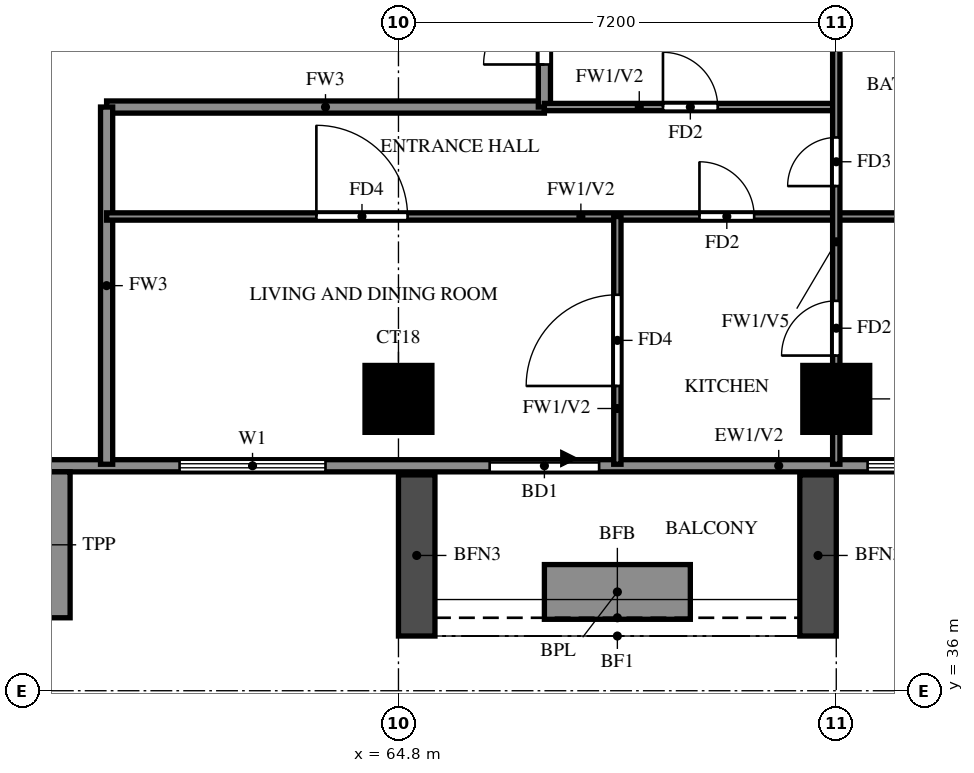
"""IFC4 building model, lengths in metres.
Left out: names, types, materials, properties, quantities, classifications, styles, units other than length and angle.
Written with IfcOpenShell. Run it as: python <this file> out.ifc"""

import sys

from ifc_helpers import new_model, si_unit, direction, frame, frame_2d, origin, origin_2d, place, context, subcontext, project, spatial, rectangle, extrude, source, transform, mapped, element, fill, save


model = new_model("IFC4")
c1 = context("Model", 3, precision=1e-05, world=origin(), true_north=direction((0.0, 1.0)))
c2 = subcontext(c1, "Body", "Model", "MODEL_VIEW")
j1 = project(units=[si_unit("LENGTHUNIT", "METRE"), si_unit("PLANEANGLEUNIT", "RADIAN")], contexts=[c1])
p1 = place(None, origin())
s1 = spatial("IfcSite", under=j1, at=p1, CompositionType="ELEMENT")
p2 = place(p1, origin())
s2 = spatial("IfcBuilding", under=s1, at=p2, CompositionType="ELEMENT")
p3 = place(p2, frame((0.0, 0.0, 116.5)))
s3 = spatial("IfcBuildingStorey", under=s2, at=p3, CompositionType="ELEMENT", Elevation=116.5)
m1 = source(origin(), c2, "Body", "SweptSolid", [
    extrude(rectangle(XDim=1.1, YDim=1.1, at=origin_2d()), origin(), (0.0, 0.0, 1.0), 3.2),
])
for number, where, z_axis, x_axis in (
    (1, (64.8, 40.8, 0.0), (0.0, 0.0, 1.0), (1.0, 0.0, 0.0)),
    (2, (72.0, 40.8, 0.0), (0.0, 0.0, 1.0), (1.0, 0.0, 0.0)),
):
    element("IfcColumn", number, at=place(p3, frame(where, z_axis=z_axis, x_axis=x_axis)), inside=s3, PredefinedType="COLUMN", context=c2, shape_type="MappedRepresentation", body=[
        mapped(m1, transform((0.0, 0.0, 0.0))),
    ])
p4 = place(p3, frame((85.719, 39.881, 0.0), z_axis=(0.0, 0.0, 1.0), x_axis=(-0.86377618652, 0.503875678716, 0.0)))
e3 = element("IfcWall", 3, at=p4, inside=s3, PredefinedType="SOLIDWALL", context=c2, shape_type="SweptSolid", body=[
    extrude(rectangle(XDim=16.311, YDim=0.2, at=frame_2d((8.156, 0.0))), origin(), (0.0, 0.0, 1.0), 3.2),
])
p5 = place(p4, frame((13.326, 0.0, 1.5)))
e4 = element("IfcOpeningElement", 4, at=p5, cuts=e3, PredefinedType="OPENING", context=c2, shape_type="SweptSolid", body=[
    extrude(rectangle(XDim=0.9, YDim=0.9, at=frame_2d((0.45, 0.45))), frame((0.0, 0.11, 0.0), z_axis=(0.0, -1.0, 0.0), x_axis=(1.0, 0.0, 0.0)), (0.0, 0.0, 1.0), 0.22),
])
p6 = place(p3, frame((58.8, 39.7, 0.0), z_axis=(0.0, 0.0, 1.0), x_axis=(1.0, 0.0, 0.0)))
e5 = element("IfcWall", 5, at=p6, inside=s3, PredefinedType="SOLIDWALL", context=c2, shape_type="SweptSolid", body=[
    extrude(rectangle(XDim=27.23, YDim=0.2, at=frame_2d((13.615, 0.0))), origin(), (0.0, 0.0, 1.0), 3.2),
])
p7 = place(p6, frame((7.5, 0.0, 0.0)))
e6 = element("IfcOpeningElement", 6, at=p7, cuts=e5, PredefinedType="OPENING", context=c2, shape_type="SweptSolid", body=[
    extrude(rectangle(XDim=1.8, YDim=2.4, at=frame_2d((0.9, 1.2))), frame((0.0, 0.11, 0.0), z_axis=(0.0, -1.0, 0.0), x_axis=(1.0, 0.0, 0.0)), (0.0, 0.0, 1.0), 0.22),
])
p8 = place(p6, frame((2.4, 0.0, 0.6)))
e7 = element("IfcOpeningElement", 7, at=p8, cuts=e5, PredefinedType="OPENING", context=c2, shape_type="SweptSolid", body=[
    extrude(rectangle(XDim=2.4, YDim=2.4, at=frame_2d((1.2, 1.2))), frame((0.0, 0.11, 0.0), z_axis=(0.0, -1.0, 0.0), x_axis=(1.0, 0.0, 0.0)), (0.0, 0.0, 1.0), 0.22),
])
p9 = place(p6, frame((13.715, 0.0, 0.6)))
e8 = element("IfcOpeningElement", 8, at=p9, cuts=e5, PredefinedType="OPENING", context=c2, shape_type="SweptSolid", body=[
    extrude(rectangle(XDim=2.4, YDim=2.4, at=frame_2d((1.2, 1.2))), frame((0.0, 0.11, 0.0), z_axis=(0.0, -1.0, 0.0), x_axis=(1.0, 0.0, 0.0)), (0.0, 0.0, 1.0), 0.22),
])
p10 = place(p6, frame((16.531, 0.0, 0.6)))
e9 = element("IfcOpeningElement", 9, at=p10, cuts=e5, PredefinedType="OPENING", context=c2, shape_type="SweptSolid", body=[
    extrude(rectangle(XDim=2.4, YDim=2.4, at=frame_2d((1.2, 1.2))), frame((0.0, 0.11, 0.0), z_axis=(0.0, -1.0, 0.0), x_axis=(1.0, 0.0, 0.0)), (0.0, 0.0, 1.0), 0.22),
])
p11 = place(p6, frame((19.346, 0.0, 0.6)))
e10 = element("IfcOpeningElement", 10, at=p11, cuts=e5, PredefinedType="OPENING", context=c2, shape_type="SweptSolid", body=[
    extrude(rectangle(XDim=2.4, YDim=2.4, at=frame_2d((1.2, 1.2))), frame((0.0, 0.11, 0.0), z_axis=(0.0, -1.0, 0.0), x_axis=(1.0, 0.0, 0.0)), (0.0, 0.0, 1.0), 0.22),
])
p12 = place(p6, frame((22.161, 0.0, 0.6)))
e11 = element("IfcOpeningElement", 11, at=p12, cuts=e5, PredefinedType="OPENING", context=c2, shape_type="SweptSolid", body=[
    extrude(rectangle(XDim=2.4, YDim=2.4, at=frame_2d((1.2, 1.2))), frame((0.0, 0.11, 0.0), z_axis=(0.0, -1.0, 0.0), x_axis=(1.0, 0.0, 0.0)), (0.0, 0.0, 1.0), 0.22),
])
p13 = place(p6, frame((26.003, 0.0, 0.6)))
e12 = element("IfcOpeningElement", 12, at=p13, cuts=e5, PredefinedType="OPENING", context=c2, shape_type="SweptSolid", body=[
    extrude(rectangle(XDim=0.9, YDim=2.4, at=frame_2d((0.45, 1.2))), frame((0.0, 0.11, 0.0), z_axis=(0.0, -1.0, 0.0), x_axis=(1.0, 0.0, 0.0)), (0.0, 0.0, 1.0), 0.22),
])
for number, where, z_axis, x_axis in (
    (13, (65.1, 39.55, 0.0), (0.0, 0.0, 1.0), (0.0, -1.0, 0.0)),
    (14, (71.7, 39.55, 0.0), (0.0, 0.0, 1.0), (0.0, -1.0, 0.0)),
):
    element("IfcWall", number, at=place(p3, frame(where, z_axis=z_axis, x_axis=x_axis)), inside=s3, PredefinedType="SOLIDWALL", context=c2, shape_type="SweptSolid", body=[
        extrude(rectangle(XDim=2.65, YDim=0.6, at=frame_2d((1.325, 0.0))), origin(), (0.0, 0.0, 1.0), 2.85),
    ])
p14 = place(p3, frame((67.2, 37.625, 0.0), z_axis=(0.0, 0.0, 1.0), x_axis=(1.0, 0.0, 0.0)))
e15 = element("IfcWall", 15, at=p14, inside=s3, PredefinedType="SOLIDWALL", context=c2, shape_type="SweptSolid", body=[
    extrude(rectangle(XDim=2.4, YDim=0.9, at=frame_2d((1.2, 0.0))), origin(), (0.0, 0.0, 1.0), 0.9),
])
p15 = place(p3, frame((58.5, 37.2, -0.3), z_axis=(0.0, 0.0, 1.0), x_axis=(0.0, 1.0, 0.0)))
e16 = element("IfcWall", 16, at=p15, inside=s3, PredefinedType="SOLIDWALL", context=c2, shape_type="SweptSolid", body=[
    extrude(rectangle(XDim=2.4, YDim=1.8, at=frame_2d((1.2, 0.0))), origin(), (0.0, 0.0, 1.0), 3.5),
])
p16 = place(p3, frame((60.0, 45.6, 0.0), z_axis=(0.0, 0.0, 1.0), x_axis=(1.0, 0.0, 0.0)))
e17 = element("IfcWall", 17, at=p16, inside=s3, PredefinedType="SOLIDWALL", context=c2, shape_type="SweptSolid", body=[
    extrude(rectangle(XDim=7.2, YDim=0.2, at=frame_2d((3.6, 0.0))), origin(), (0.0, 0.0, 1.0), 3.2),
])
p17 = place(p3, frame((60.0, 39.725, 0.0), z_axis=(0.0, 0.0, 1.0), x_axis=(0.0, 1.0, 0.0)))
e18 = element("IfcWall", 18, at=p17, inside=s3, PredefinedType="SOLIDWALL", context=c2, shape_type="SweptSolid", body=[
    extrude(rectangle(XDim=5.875, YDim=0.2, at=frame_2d((2.938, 0.0))), origin(), (0.0, 0.0, 1.0), 3.2),
])
p18 = place(p3, frame((67.2, 45.6, 0.0), z_axis=(0.0, 0.0, 1.0), x_axis=(0.0, 1.0, 0.0)))
e19 = element("IfcWall", 19, at=p18, inside=s3, PredefinedType="SOLIDWALL", context=c2, shape_type="SweptSolid", body=[
    extrude(rectangle(XDim=8.4, YDim=0.2, at=frame_2d((4.2, 0.0))), origin(), (0.0, 0.0, 1.0), 3.2),
])
p19 = place(p18, frame((0.7, 0.0, 0.0)))
e20 = element("IfcOpeningElement", 20, at=p19, cuts=e19, PredefinedType="OPENING", context=c2, shape_type="SweptSolid", body=[
    extrude(rectangle(XDim=1.0, YDim=2.1, at=frame_2d((0.5, 1.05))), frame((0.0, 0.11, 0.0), z_axis=(0.0, -1.0, 0.0), x_axis=(1.0, 0.0, 0.0)), (0.0, 0.0, 1.0), 0.22),
])
p20 = place(p3, frame((60.0, 43.8, 0.0), z_axis=(0.0, 0.0, 1.0), x_axis=(1.0, 0.0, 0.0)))
e21 = element("IfcWall", 21, at=p20, inside=s3, PredefinedType="PARTITIONING", context=c2, shape_type="SweptSolid", body=[
    extrude(rectangle(XDim=15.6, YDim=0.12, at=frame_2d((7.8, 0.0))), origin(), (0.0, 0.0, 1.0), 3.2),
])
p21 = place(p20, frame((9.75, 0.0, 0.0)))
e22 = element("IfcOpeningElement", 22, at=p21, cuts=e21, PredefinedType="OPENING", context=c2, shape_type="SweptSolid", body=[
    extrude(rectangle(XDim=0.9, YDim=2.1, at=frame_2d((0.45, 1.05))), frame((0.0, 0.07, 0.0), z_axis=(0.0, -1.0, 0.0), x_axis=(1.0, 0.0, 0.0)), (0.0, 0.0, 1.0), 0.14),
])
p22 = place(p20, frame((3.45, 0.0, 0.0)))
e23 = element("IfcOpeningElement", 23, at=p22, cuts=e21, PredefinedType="OPENING", context=c2, shape_type="SweptSolid", body=[
    extrude(rectangle(XDim=1.5, YDim=2.1, at=frame_2d((0.75, 1.05))), frame((0.0, 0.07, 0.0), z_axis=(0.0, -1.0, 0.0), x_axis=(1.0, 0.0, 0.0)), (0.0, 0.0, 1.0), 0.14),
])
p23 = place(p20, frame((13.4, 0.0, 0.0)))
e24 = element("IfcOpeningElement", 24, at=p23, cuts=e21, PredefinedType="OPENING", context=c2, shape_type="SweptSolid", body=[
    extrude(rectangle(XDim=0.8, YDim=2.1, at=frame_2d((0.4, 1.05))), frame((0.0, 0.07, 0.0), z_axis=(0.0, -1.0, 0.0), x_axis=(1.0, 0.0, 0.0)), (0.0, 0.0, 1.0), 0.14),
])
p24 = place(p3, frame((67.2, 45.6, 0.0), z_axis=(0.0, 0.0, 1.0), x_axis=(1.0, 0.0, 0.0)))
e25 = element("IfcWall", 25, at=p24, inside=s3, PredefinedType="PARTITIONING", context=c2, shape_type="SweptSolid", body=[
    extrude(rectangle(XDim=4.8, YDim=0.12, at=frame_2d((2.4, 0.0))), origin(), (0.0, 0.0, 1.0), 3.2),
])
p25 = place(p24, frame((1.95, 0.0, 0.0)))
e26 = element("IfcOpeningElement", 26, at=p25, cuts=e25, PredefinedType="OPENING", context=c2, shape_type="SweptSolid", body=[
    extrude(rectangle(XDim=0.9, YDim=2.1, at=frame_2d((0.45, 1.05))), frame((0.0, 0.07, 0.0), z_axis=(0.0, -1.0, 0.0), x_axis=(1.0, 0.0, 0.0)), (0.0, 0.0, 1.0), 0.14),
])
p26 = place(p3, frame((68.4, 39.725, 0.0), z_axis=(0.0, 0.0, 1.0), x_axis=(0.0, 1.0, 0.0)))
e27 = element("IfcWall", 27, at=p26, inside=s3, PredefinedType="PARTITIONING", context=c2, shape_type="SweptSolid", body=[
    extrude(rectangle(XDim=4.075, YDim=0.12, at=frame_2d((2.038, 0.0))), origin(), (0.0, 0.0, 1.0), 3.2),
])
p27 = place(p26, frame((1.288, 0.0, 0.0)))
e28 = element("IfcOpeningElement", 28, at=p27, cuts=e27, PredefinedType="OPENING", context=c2, shape_type="SweptSolid", body=[
    extrude(rectangle(XDim=1.5, YDim=2.1, at=frame_2d((0.75, 1.05))), frame((0.0, 0.07, 0.0), z_axis=(0.0, -1.0, 0.0), x_axis=(1.0, 0.0, 0.0)), (0.0, 0.0, 1.0), 0.14),
])
p28 = place(p3, frame((72.0, 39.725, 0.0), z_axis=(0.0, 0.0, 1.0), x_axis=(0.0, 1.0, 0.0)))
e29 = element("IfcWall", 29, at=p28, inside=s3, PredefinedType="PARTITIONING", context=c2, shape_type="SweptSolid", body=[
    extrude(rectangle(XDim=8.13, YDim=0.12, at=frame_2d((4.065, 0.0))), origin(), (0.0, 0.0, 1.0), 2.3),
])
p29 = place(p28, frame((1.788, 0.0, 0.0)))
e30 = element("IfcOpeningElement", 30, at=p29, cuts=e29, PredefinedType="OPENING", context=c2, shape_type="SweptSolid", body=[
    extrude(rectangle(XDim=0.9, YDim=2.1, at=frame_2d((0.45, 1.05))), frame((0.0, 0.07, 0.0), z_axis=(0.0, -1.0, 0.0), x_axis=(1.0, 0.0, 0.0)), (0.0, 0.0, 1.0), 0.14),
])
p30 = place(p28, frame((4.575, 0.0, 0.0)))
e31 = element("IfcOpeningElement", 31, at=p30, cuts=e29, PredefinedType="OPENING", context=c2, shape_type="SweptSolid", body=[
    extrude(rectangle(XDim=0.8, YDim=2.1, at=frame_2d((0.4, 1.05))), frame((0.0, 0.07, 0.0), z_axis=(0.0, -1.0, 0.0), x_axis=(1.0, 0.0, 0.0)), (0.0, 0.0, 1.0), 0.14),
])
p31 = place(p7, origin())
e32 = element("IfcDoor", 32, at=p31, inside=s3, OperationType="DOUBLE_DOOR_SLIDING", PredefinedType="DOOR", context=c2, shape_type="SweptSolid", body=[
    extrude(rectangle(XDim=1.8, YDim=2.4, at=frame_2d((0.9, 1.2))), frame((0.0, 0.025, 0.0), z_axis=(0.0, -1.0, 0.0), x_axis=(1.0, 0.0, 0.0)), (0.0, 0.0, 1.0), 0.05),
])
fill(e6, e32)
p32 = place(p8, origin())
e33 = element("IfcWindow", 33, at=p32, inside=s3, PartitioningType="DOUBLE_PANEL_VERTICAL", PredefinedType="WINDOW", context=c2, shape_type="SweptSolid", body=[
    extrude(rectangle(XDim=2.4, YDim=2.4, at=frame_2d((1.2, 1.2))), frame((0.0, 0.03, 0.0), z_axis=(0.0, -1.0, 0.0), x_axis=(1.0, 0.0, 0.0)), (0.0, 0.0, 1.0), 0.06),
])
fill(e7, e33)
p33 = place(p9, origin())
e34 = element("IfcWindow", 34, at=p33, inside=s3, PartitioningType="DOUBLE_PANEL_VERTICAL", PredefinedType="WINDOW", context=c2, shape_type="SweptSolid", body=[
    extrude(rectangle(XDim=2.4, YDim=2.4, at=frame_2d((1.2, 1.2))), frame((0.0, 0.03, 0.0), z_axis=(0.0, -1.0, 0.0), x_axis=(1.0, 0.0, 0.0)), (0.0, 0.0, 1.0), 0.06),
])
fill(e8, e34)
p34 = place(p27, origin())
e35 = element("IfcDoor", 35, at=p34, inside=s3, OperationType="SINGLE_SWING_LEFT", PredefinedType="DOOR", context=c2, shape_type="SweptSolid", body=[
    extrude(rectangle(XDim=1.5, YDim=2.1, at=frame_2d((0.75, 1.05))), frame((0.0, 0.025, 0.0), z_axis=(0.0, -1.0, 0.0), x_axis=(1.0, 0.0, 0.0)), (0.0, 0.0, 1.0), 0.05),
])
fill(e28, e35)
p35 = place(p25, origin())
e36 = element("IfcDoor", 36, at=p35, inside=s3, OperationType="SINGLE_SWING_LEFT", PredefinedType="DOOR", context=c2, shape_type="SweptSolid", body=[
    extrude(rectangle(XDim=0.9, YDim=2.1, at=frame_2d((0.45, 1.05))), frame((0.0, 0.025, 0.0), z_axis=(0.0, -1.0, 0.0), x_axis=(1.0, 0.0, 0.0)), (0.0, 0.0, 1.0), 0.05),
])
fill(e26, e36)
p36 = place(p19, origin())
e37 = element("IfcDoor", 37, at=p36, inside=s3, OperationType="SINGLE_SWING_RIGHT", PredefinedType="DOOR", context=c2, shape_type="SweptSolid", body=[
    extrude(rectangle(XDim=1.0, YDim=2.1, at=frame_2d((0.5, 1.05))), frame((0.0, 0.025, 0.0), z_axis=(0.0, -1.0, 0.0), x_axis=(1.0, 0.0, 0.0)), (0.0, 0.0, 1.0), 0.05),
])
fill(e20, e37)
p37 = place(p21, origin())
e38 = element("IfcDoor", 38, at=p37, inside=s3, OperationType="SINGLE_SWING_LEFT", PredefinedType="DOOR", context=c2, shape_type="SweptSolid", body=[
    extrude(rectangle(XDim=0.9, YDim=2.1, at=frame_2d((0.45, 1.05))), frame((0.0, 0.025, 0.0), z_axis=(0.0, -1.0, 0.0), x_axis=(1.0, 0.0, 0.0)), (0.0, 0.0, 1.0), 0.05),
])
fill(e22, e38)
p38 = place(p22, origin())
e39 = element("IfcDoor", 39, at=p38, inside=s3, OperationType="SINGLE_SWING_LEFT", PredefinedType="DOOR", context=c2, shape_type="SweptSolid", body=[
    extrude(rectangle(XDim=1.5, YDim=2.1, at=frame_2d((0.75, 1.05))), frame((0.0, 0.025, 0.0), z_axis=(0.0, -1.0, 0.0), x_axis=(1.0, 0.0, 0.0)), (0.0, 0.0, 1.0), 0.05),
])
fill(e23, e39)
p39 = place(p29, origin())
e40 = element("IfcDoor", 40, at=p39, inside=s3, OperationType="SINGLE_SWING_LEFT", PredefinedType="DOOR", context=c2, shape_type="SweptSolid", body=[
    extrude(rectangle(XDim=0.9, YDim=2.1, at=frame_2d((0.45, 1.05))), frame((0.0, 0.025, 0.0), z_axis=(0.0, -1.0, 0.0), x_axis=(1.0, 0.0, 0.0)), (0.0, 0.0, 1.0), 0.05),
])
fill(e30, e40)
p40 = place(p30, origin())
e41 = element("IfcDoor", 41, at=p40, inside=s3, OperationType="SINGLE_SWING_LEFT", PredefinedType="DOOR", context=c2, shape_type="SweptSolid", body=[
    extrude(rectangle(XDim=0.8, YDim=2.1, at=frame_2d((0.4, 1.05))), frame((0.0, 0.025, 0.0), z_axis=(0.0, -1.0, 0.0), x_axis=(1.0, 0.0, 0.0)), (0.0, 0.0, 1.0), 0.05),
])
fill(e31, e41)
save(model, sys.argv[1])
